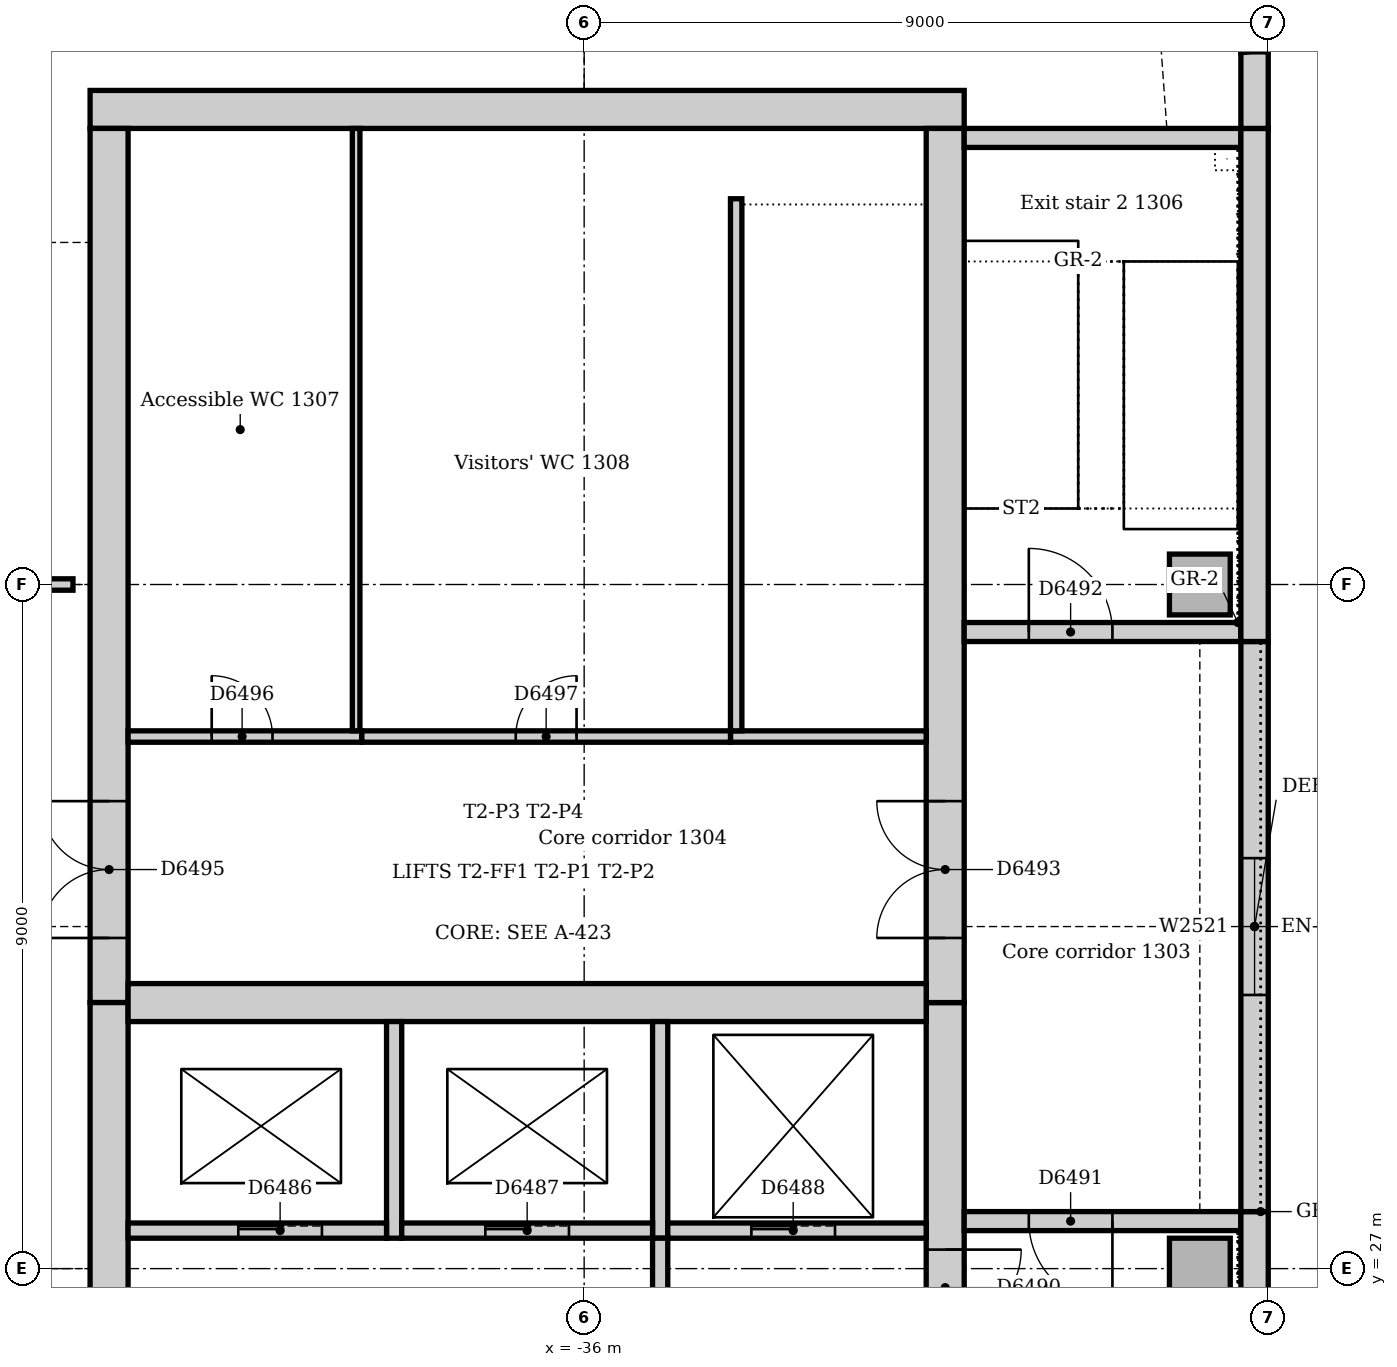
"""IFC4 building model, lengths in metres.
Left out: names, types, materials, properties, quantities, classifications, styles, units other than length and angle.
Written with IfcOpenShell. Run it as: python <this file> out.ifc"""

import sys

from ifc_helpers import new_model, si_unit, direction, frame, frame_2d, origin, origin_2d, place, context, subcontext, project, spatial, rectangle, extrude, element, fill, save


model = new_model("IFC4")
c1 = context("Model", 3, precision=1e-05, world=origin(), true_north=direction((0.0, 1.0)))
c2 = subcontext(c1, "Body", "Model", "MODEL_VIEW")
j1 = project(units=[si_unit("LENGTHUNIT", "METRE"), si_unit("PLANEANGLEUNIT", "RADIAN")], contexts=[c1])
p1 = place(None, origin())
s1 = spatial("IfcSite", under=j1, at=p1, CompositionType="ELEMENT")
p2 = place(p1, origin())
s2 = spatial("IfcBuilding", under=s1, at=p2, CompositionType="ELEMENT")
p3 = place(p2, frame((0.0, 0.0, 59.0)))
s3 = spatial("IfcBuildingStorey", under=s2, at=p3, CompositionType="ELEMENT", Elevation=59.0)
p4 = place(p3, frame((-31.0, 42.25, 0.0), z_axis=(0.0, 0.0, 1.0), x_axis=(-1.0, 0.0, 0.0)))
e1 = element("IfcWall", 1, at=p4, inside=s3, PredefinedType="SOLIDWALL", context=c2, shape_type="SweptSolid", body=[
    extrude(rectangle(XDim=11.5, YDim=0.5, at=frame_2d((5.75, 0.0))), origin(), (0.0, 0.0, 1.0), 4.0),
])
p5 = place(p3, frame((-31.25, 21.0, 0.0), z_axis=(0.0, 0.0, 1.0), x_axis=(0.0, 1.0, 0.0)))
e2 = element("IfcWall", 2, at=p5, inside=s3, PredefinedType="SOLIDWALL", context=c2, shape_type="SweptSolid", body=[
    extrude(rectangle(XDim=9.5, YDim=0.5, at=frame_2d((4.75, 0.0))), origin(), (0.0, 0.0, 1.0), 4.0),
])
p6 = place(p5, frame((5.25, 0.0, 0.0)))
e3 = element("IfcOpeningElement", 3, at=p6, cuts=e2, PredefinedType="OPENING", context=c2, shape_type="SweptSolid", body=[
    extrude(rectangle(XDim=1.0, YDim=2.1, at=frame_2d((0.5, 1.05))), frame((0.0, 0.26, 0.0), z_axis=(0.0, -1.0, 0.0), x_axis=(1.0, 0.0, 0.0)), (0.0, 0.0, 1.0), 0.52),
])
p7 = place(p3, frame((-31.25, 30.5, 0.0), z_axis=(0.0, 0.0, 1.0), x_axis=(0.0, 1.0, 0.0)))
e4 = element("IfcWall", 4, at=p7, inside=s3, PredefinedType="SOLIDWALL", context=c2, shape_type="SweptSolid", body=[
    extrude(rectangle(XDim=11.5, YDim=0.5, at=frame_2d((5.75, 0.0))), origin(), (0.0, 0.0, 1.0), 4.0),
])
p8 = place(p7, frame((0.85, 0.0, 0.0)))
e5 = element("IfcOpeningElement", 5, at=p8, cuts=e4, PredefinedType="OPENING", context=c2, shape_type="SweptSolid", body=[
    extrude(rectangle(XDim=1.8, YDim=2.1, at=frame_2d((0.9, 1.05))), frame((0.0, 0.26, 0.0), z_axis=(0.0, -1.0, 0.0), x_axis=(1.0, 0.0, 0.0)), (0.0, 0.0, 1.0), 0.52),
])
p9 = place(p3, frame((-42.25, 42.0, 0.0), z_axis=(0.0, 0.0, 1.0), x_axis=(0.0, -1.0, 0.0)))
e6 = element("IfcWall", 6, at=p9, inside=s3, PredefinedType="SOLIDWALL", context=c2, shape_type="SweptSolid", body=[
    extrude(rectangle(XDim=11.5, YDim=0.5, at=frame_2d((5.75, 0.0))), origin(), (0.0, 0.0, 1.0), 4.0),
])
p10 = place(p9, frame((8.85, 0.0, 0.0)))
e7 = element("IfcOpeningElement", 7, at=p10, cuts=e6, PredefinedType="OPENING", context=c2, shape_type="SweptSolid", body=[
    extrude(rectangle(XDim=1.8, YDim=2.1, at=frame_2d((0.9, 1.05))), frame((0.0, 0.26, 0.0), z_axis=(0.0, -1.0, 0.0), x_axis=(1.0, 0.0, 0.0)), (0.0, 0.0, 1.0), 0.52),
])
p11 = place(p3, frame((-42.25, 30.5, 0.0), z_axis=(0.0, 0.0, 1.0), x_axis=(0.0, -1.0, 0.0)))
e8 = element("IfcWall", 8, at=p11, inside=s3, PredefinedType="SOLIDWALL", context=c2, shape_type="SweptSolid", body=[
    extrude(rectangle(XDim=9.5, YDim=0.5, at=frame_2d((4.75, 0.0))), origin(), (0.0, 0.0, 1.0), 4.0),
])
p12 = place(p11, frame((3.85, 0.0, 0.0)))
e9 = element("IfcOpeningElement", 9, at=p12, cuts=e8, PredefinedType="OPENING", context=c2, shape_type="SweptSolid", body=[
    extrude(rectangle(XDim=1.8, YDim=2.1, at=frame_2d((0.9, 1.05))), frame((0.0, 0.26, 0.0), z_axis=(0.0, -1.0, 0.0), x_axis=(1.0, 0.0, 0.0)), (0.0, 0.0, 1.0), 0.52),
])
p13 = place(p3, frame((-42.0, 30.5, 0.0), z_axis=(0.0, 0.0, 1.0), x_axis=(1.0, 0.0, 0.0)))
e10 = element("IfcWall", 10, at=p13, inside=s3, PredefinedType="SOLIDWALL", context=c2, shape_type="SweptSolid", body=[
    extrude(rectangle(XDim=10.5, YDim=0.5, at=frame_2d((5.25, 0.0))), origin(), (0.0, 0.0, 1.0), 4.0),
])
p14 = place(p3, frame((-27.36, 27.625, 0.0), z_axis=(0.0, 0.0, 1.0), x_axis=(-1.0, 0.0, 0.0)))
e11 = element("IfcWall", 11, at=p14, inside=s3, PredefinedType="SOLIDWALL", context=c2, shape_type="SweptSolid", body=[
    extrude(rectangle(XDim=3.64, YDim=0.25, at=frame_2d((1.82, 0.0))), origin(), (0.0, 0.0, 1.0), 4.0),
])
p15 = place(p14, frame((1.69, 0.0, 0.0)))
e12 = element("IfcOpeningElement", 12, at=p15, cuts=e11, PredefinedType="OPENING", context=c2, shape_type="SweptSolid", body=[
    extrude(rectangle(XDim=1.1, YDim=2.1, at=frame_2d((0.55, 1.05))), frame((0.0, 0.135, 0.0), z_axis=(0.0, -1.0, 0.0), x_axis=(1.0, 0.0, 0.0)), (0.0, 0.0, 1.0), 0.27),
])
p16 = place(p3, frame((-31.0, 35.375, 0.0), z_axis=(0.0, 0.0, 1.0), x_axis=(1.0, 0.0, 0.0)))
e13 = element("IfcWall", 13, at=p16, inside=s3, PredefinedType="SOLIDWALL", context=c2, shape_type="SweptSolid", body=[
    extrude(rectangle(XDim=3.64, YDim=0.25, at=frame_2d((1.82, 0.0))), origin(), (0.0, 0.0, 1.0), 4.0),
])
p17 = place(p16, frame((0.85, 0.0, 0.0)))
e14 = element("IfcOpeningElement", 14, at=p17, cuts=e13, PredefinedType="OPENING", context=c2, shape_type="SweptSolid", body=[
    extrude(rectangle(XDim=1.1, YDim=2.1, at=frame_2d((0.55, 1.05))), frame((0.0, 0.135, 0.0), z_axis=(0.0, -1.0, 0.0), x_axis=(1.0, 0.0, 0.0)), (0.0, 0.0, 1.0), 0.27),
])
p18 = place(p3, frame((-27.36, 41.875, 0.0), z_axis=(0.0, 0.0, 1.0), x_axis=(-1.0, 0.0, 0.0)))
e15 = element("IfcWall", 15, at=p18, inside=s3, PredefinedType="SOLIDWALL", context=c2, shape_type="SweptSolid", body=[
    extrude(rectangle(XDim=3.64, YDim=0.25, at=frame_2d((1.82, 0.0))), origin(), (0.0, 0.0, 1.0), 4.0),
])
for number, where, z_axis, x_axis in (
    (16, (-27.9, 27.0, 0.0), (0.0, 0.0, 1.0), (1.0, 0.0, 0.0)),
    (17, (-27.9, 36.0, 0.0), (0.0, 0.0, 1.0), (1.0, 0.0, 0.0)),
):
    element("IfcColumn", number, at=place(p3, frame(where, z_axis=z_axis, x_axis=x_axis)), inside=s3, PredefinedType="COLUMN", context=c2, shape_type="SweptSolid", body=[
        extrude(rectangle(XDim=0.8, YDim=0.8, at=origin_2d()), origin(), (0.0, 0.0, 1.0), 4.0),
    ])
p19 = place(p3, frame((-27.18, 21.0, 0.0), z_axis=(0.0, 0.0, 1.0), x_axis=(0.0, 1.0, 0.0)))
e18 = element("IfcWall", 18, at=p19, inside=s3, PredefinedType="STANDARD", context=c2, shape_type="SweptSolid", body=[
    extrude(rectangle(XDim=6.75, YDim=0.36, at=frame_2d((3.375, 0.0))), origin(), (0.0, 0.0, 1.0), 3.85),
])
p20 = place(p3, frame((-27.18, 27.75, 0.0), z_axis=(0.0, 0.0, 1.0), x_axis=(0.0, 1.0, 0.0)))
e19 = element("IfcWall", 19, at=p20, inside=s3, PredefinedType="STANDARD", context=c2, shape_type="SweptSolid", body=[
    extrude(rectangle(XDim=7.5, YDim=0.36, at=frame_2d((3.75, 0.0))), origin(), (0.0, 0.0, 1.0), 3.85),
])
p21 = place(p20, frame((2.85, 0.0, 1.2)))
e20 = element("IfcOpeningElement", 20, at=p21, cuts=e19, PredefinedType="OPENING", context=c2, shape_type="SweptSolid", body=[
    extrude(rectangle(XDim=1.8, YDim=1.2, at=frame_2d((0.9, 0.6))), frame((0.0, 0.19, 0.0), z_axis=(0.0, -1.0, 0.0), x_axis=(1.0, 0.0, 0.0)), (0.0, 0.0, 1.0), 0.38),
])
p22 = place(p3, frame((-27.18, 35.25, 0.0), z_axis=(0.0, 0.0, 1.0), x_axis=(0.0, 1.0, 0.0)))
e21 = element("IfcWall", 21, at=p22, inside=s3, PredefinedType="STANDARD", context=c2, shape_type="SweptSolid", body=[
    extrude(rectangle(XDim=6.75, YDim=0.36, at=frame_2d((3.375, 0.0))), origin(), (0.0, 0.0, 1.0), 3.85),
])
p23 = place(p3, frame((-27.18, 42.0, 0.0), z_axis=(0.0, 0.0, 1.0), x_axis=(0.0, 1.0, 0.0)))
e22 = element("IfcWall", 22, at=p23, inside=s3, PredefinedType="STANDARD", context=c2, shape_type="SweptSolid", body=[
    extrude(rectangle(XDim=1.007, YDim=0.36, at=frame_2d((0.504, 0.0))), origin(), (0.0, 0.0, 1.0), 3.85),
])
p24 = place(p3, frame((-27.183, 43.019, 0.0), z_axis=(0.0, 0.0, 1.0), x_axis=(-0.13055608231, 0.99144092581, 0.0)))
e23 = element("IfcWall", 23, at=p24, inside=s3, PredefinedType="STANDARD", context=c2, shape_type="SweptSolid", body=[
    extrude(rectangle(XDim=0.713, YDim=0.36, at=frame_2d((0.356, 0.0))), origin(), (0.0, 0.0, 1.0), 3.85),
])
p25 = place(p3, frame((-38.5, 27.4, 0.0), z_axis=(0.0, 0.0, 1.0), x_axis=(0.0, 1.0, 0.0)))
e24 = element("IfcWall", 24, at=p25, inside=s3, PredefinedType="SOLIDWALL", context=c2, shape_type="SweptSolid", body=[
    extrude(rectangle(XDim=2.85, YDim=0.2, at=frame_2d((1.425, 0.0))), origin(), (0.0, 0.0, 1.0), 4.0),
])
p26 = place(p3, frame((-42.0, 27.5, 0.0), z_axis=(0.0, 0.0, 1.0), x_axis=(1.0, 0.0, 0.0)))
e25 = element("IfcWall", 25, at=p26, inside=s3, PredefinedType="SOLIDWALL", context=c2, shape_type="SweptSolid", body=[
    extrude(rectangle(XDim=3.4, YDim=0.2, at=frame_2d((1.7, 0.0))), origin(), (0.0, 0.0, 1.0), 4.0),
])
p27 = place(p26, frame((1.45, 0.0, 0.0)))
e26 = element("IfcOpeningElement", 26, at=p27, cuts=e25, PredefinedType="OPENING", context=c2, shape_type="SweptSolid", body=[
    extrude(rectangle(XDim=1.1, YDim=2.1, at=frame_2d((0.55, 1.05))), frame((0.0, 0.11, 0.0), z_axis=(0.0, -1.0, 0.0), x_axis=(1.0, 0.0, 0.0)), (0.0, 0.0, 1.0), 0.22),
])
p28 = place(p3, frame((-35.0, 27.4, 0.0), z_axis=(0.0, 0.0, 1.0), x_axis=(0.0, 1.0, 0.0)))
e27 = element("IfcWall", 27, at=p28, inside=s3, PredefinedType="SOLIDWALL", context=c2, shape_type="SweptSolid", body=[
    extrude(rectangle(XDim=2.85, YDim=0.2, at=frame_2d((1.425, 0.0))), origin(), (0.0, 0.0, 1.0), 4.0),
])
p29 = place(p3, frame((-38.4, 27.5, 0.0), z_axis=(0.0, 0.0, 1.0), x_axis=(1.0, 0.0, 0.0)))
e28 = element("IfcWall", 28, at=p29, inside=s3, PredefinedType="SOLIDWALL", context=c2, shape_type="SweptSolid", body=[
    extrude(rectangle(XDim=3.3, YDim=0.2, at=frame_2d((1.65, 0.0))), origin(), (0.0, 0.0, 1.0), 4.0),
])
p30 = place(p29, frame((1.1, 0.0, 0.0)))
e29 = element("IfcOpeningElement", 29, at=p30, cuts=e28, PredefinedType="OPENING", context=c2, shape_type="SweptSolid", body=[
    extrude(rectangle(XDim=1.1, YDim=2.1, at=frame_2d((0.55, 1.05))), frame((0.0, 0.11, 0.0), z_axis=(0.0, -1.0, 0.0), x_axis=(1.0, 0.0, 0.0)), (0.0, 0.0, 1.0), 0.22),
])
p31 = place(p3, frame((-34.9, 27.5, 0.0), z_axis=(0.0, 0.0, 1.0), x_axis=(1.0, 0.0, 0.0)))
e30 = element("IfcWall", 30, at=p31, inside=s3, PredefinedType="SOLIDWALL", context=c2, shape_type="SweptSolid", body=[
    extrude(rectangle(XDim=3.4, YDim=0.2, at=frame_2d((1.7, 0.0))), origin(), (0.0, 0.0, 1.0), 4.0),
])
p32 = place(p31, frame((1.1, 0.0, 0.0)))
e31 = element("IfcOpeningElement", 31, at=p32, cuts=e30, PredefinedType="OPENING", context=c2, shape_type="SweptSolid", body=[
    extrude(rectangle(XDim=1.1, YDim=2.1, at=frame_2d((0.55, 1.05))), frame((0.0, 0.11, 0.0), z_axis=(0.0, -1.0, 0.0), x_axis=(1.0, 0.0, 0.0)), (0.0, 0.0, 1.0), 0.22),
])
p33 = place(p3, frame((-35.0, 24.1, 0.0), z_axis=(0.0, 0.0, 1.0), x_axis=(0.0, 1.0, 0.0)))
e32 = element("IfcWall", 32, at=p33, inside=s3, PredefinedType="SOLIDWALL", context=c2, shape_type="SweptSolid", body=[
    extrude(rectangle(XDim=3.3, YDim=0.2, at=frame_2d((1.65, 0.0))), origin(), (0.0, 0.0, 1.0), 4.0),
])
p34 = place(p33, frame((1.15, 0.0, 0.0)))
e33 = element("IfcOpeningElement", 33, at=p34, cuts=e32, PredefinedType="OPENING", context=c2, shape_type="SweptSolid", body=[
    extrude(rectangle(XDim=1.0, YDim=2.1, at=frame_2d((0.5, 1.05))), frame((0.0, 0.11, 0.0), z_axis=(0.0, -1.0, 0.0), x_axis=(1.0, 0.0, 0.0)), (0.0, 0.0, 1.0), 0.22),
])
p35 = place(p3, frame((-34.075, 34.0, 0.0), z_axis=(0.0, 0.0, 1.0), x_axis=(1.0, 0.0, 0.0)))
e34 = element("IfcWall", 34, at=p35, inside=s3, PredefinedType="SOLIDWALL", context=c2, shape_type="SweptSolid", body=[
    extrude(rectangle(XDim=2.575, YDim=0.15, at=frame_2d((1.288, 0.0))), origin(), (0.0, 0.0, 1.0), 4.0),
])
p36 = place(p3, frame((-34.0, 41.075, 0.0), z_axis=(0.0, 0.0, 1.0), x_axis=(0.0, -1.0, 0.0)))
e35 = element("IfcWall", 35, at=p36, inside=s3, PredefinedType="SOLIDWALL", context=c2, shape_type="SweptSolid", body=[
    extrude(rectangle(XDim=7.0, YDim=0.15, at=frame_2d((3.5, 0.0))), origin(), (0.0, 0.0, 1.0), 4.0),
])
p37 = place(p3, frame((-38.925, 34.0, 0.0), z_axis=(0.0, 0.0, 1.0), x_axis=(-1.0, 0.0, 0.0)))
e36 = element("IfcWall", 36, at=p37, inside=s3, PredefinedType="PARTITIONING", context=c2, shape_type="SweptSolid", body=[
    extrude(rectangle(XDim=3.075, YDim=0.15, at=frame_2d((1.538, 0.0))), origin(), (0.0, 0.0, 1.0), 3.85),
])
p38 = place(p37, frame((1.175, 0.0, 0.0)))
e37 = element("IfcOpeningElement", 37, at=p38, cuts=e36, PredefinedType="OPENING", context=c2, shape_type="SweptSolid", body=[
    extrude(rectangle(XDim=0.8, YDim=2.1, at=frame_2d((0.4, 1.05))), frame((0.0, 0.085, 0.0), z_axis=(0.0, -1.0, 0.0), x_axis=(1.0, 0.0, 0.0)), (0.0, 0.0, 1.0), 0.17),
])
p39 = place(p3, frame((-34.075, 34.0, 0.0), z_axis=(0.0, 0.0, 1.0), x_axis=(-1.0, 0.0, 0.0)))
e38 = element("IfcWall", 38, at=p39, inside=s3, PredefinedType="PARTITIONING", context=c2, shape_type="SweptSolid", body=[
    extrude(rectangle(XDim=4.85, YDim=0.15, at=frame_2d((2.425, 0.0))), origin(), (0.0, 0.0, 1.0), 3.85),
])
p40 = place(p39, frame((2.025, 0.0, 0.0)))
e39 = element("IfcOpeningElement", 39, at=p40, cuts=e38, PredefinedType="OPENING", context=c2, shape_type="SweptSolid", body=[
    extrude(rectangle(XDim=0.8, YDim=2.1, at=frame_2d((0.4, 1.05))), frame((0.0, 0.085, 0.0), z_axis=(0.0, -1.0, 0.0), x_axis=(1.0, 0.0, 0.0)), (0.0, 0.0, 1.0), 0.17),
])
p41 = place(p3, frame((-39.0, 34.075, 0.0), z_axis=(0.0, 0.0, 1.0), x_axis=(0.0, 1.0, 0.0)))
e40 = element("IfcWall", 40, at=p41, inside=s3, PredefinedType="PARTITIONING", context=c2, shape_type="SweptSolid", body=[
    extrude(rectangle(XDim=7.925, YDim=0.1, at=frame_2d((3.962, 0.0))), origin(), (0.0, 0.0, 1.0), 3.85),
])
p42 = place(p3, frame((-44.65, 36.0, 0.0), z_axis=(0.0, 0.0, 1.0), x_axis=(1.0, 0.0, 0.0)))
e41 = element("IfcWall", 41, at=p42, inside=s3, PredefinedType="PARTITIONING", context=c2, shape_type="SweptSolid", body=[
    extrude(rectangle(XDim=1.925, YDim=0.15, at=frame_2d((0.963, 0.0))), origin(), (0.0, 0.0, 1.0), 3.602),
])
p43 = place(p42, frame((0.5, 0.0, 0.0)))
e42 = element("IfcOpeningElement", 42, at=p43, cuts=e41, PredefinedType="OPENING", context=c2, shape_type="SweptSolid", body=[
    extrude(rectangle(XDim=0.9, YDim=2.1, at=frame_2d((0.45, 1.05))), frame((0.0, 0.085, 0.0), z_axis=(0.0, -1.0, 0.0), x_axis=(1.0, 0.0, 0.0)), (0.0, 0.0, 1.0), 0.17),
])
p44 = place(p21, origin())
e43 = element("IfcWindow", 43, at=p44, inside=s3, PartitioningType="SINGLE_PANEL", PredefinedType="WINDOW", context=c2, shape_type="SweptSolid", body=[
    extrude(rectangle(XDim=1.8, YDim=1.2, at=frame_2d((0.9, 0.6))), frame((0.0, 0.13, 0.0), z_axis=(0.0, -1.0, 0.0), x_axis=(1.0, 0.0, 0.0)), (0.0, 0.0, 1.0), 0.06),
])
fill(e20, e43)
p45 = place(p27, origin())
e44 = element("IfcDoor", 44, at=p45, inside=s3, OperationType="SLIDING_TO_LEFT", PredefinedType="DOOR", context=c2, shape_type="SweptSolid", body=[
    extrude(rectangle(XDim=1.1, YDim=2.1, at=frame_2d((0.55, 1.05))), frame((0.0, 0.025, 0.0), z_axis=(0.0, -1.0, 0.0), x_axis=(1.0, 0.0, 0.0)), (0.0, 0.0, 1.0), 0.05),
])
fill(e26, e44)
p46 = place(p30, origin())
e45 = element("IfcDoor", 45, at=p46, inside=s3, OperationType="SLIDING_TO_LEFT", PredefinedType="DOOR", context=c2, shape_type="SweptSolid", body=[
    extrude(rectangle(XDim=1.1, YDim=2.1, at=frame_2d((0.55, 1.05))), frame((0.0, 0.025, 0.0), z_axis=(0.0, -1.0, 0.0), x_axis=(1.0, 0.0, 0.0)), (0.0, 0.0, 1.0), 0.05),
])
fill(e29, e45)
p47 = place(p32, origin())
e46 = element("IfcDoor", 46, at=p47, inside=s3, OperationType="SLIDING_TO_LEFT", PredefinedType="DOOR", context=c2, shape_type="SweptSolid", body=[
    extrude(rectangle(XDim=1.1, YDim=2.1, at=frame_2d((0.55, 1.05))), frame((0.0, 0.025, 0.0), z_axis=(0.0, -1.0, 0.0), x_axis=(1.0, 0.0, 0.0)), (0.0, 0.0, 1.0), 0.05),
])
fill(e31, e46)
p48 = place(p6, frame((1.0, 0.0, 0.0), z_axis=(0.0, 0.0, 1.0), x_axis=(-1.0, 0.0, 0.0)))
e47 = element("IfcDoor", 47, at=p48, inside=s3, OperationType="SINGLE_SWING_LEFT", PredefinedType="DOOR", context=c2, shape_type="SweptSolid", body=[
    extrude(rectangle(XDim=1.0, YDim=2.1, at=frame_2d((0.5, 1.05))), frame((0.0, 0.025, 0.0), z_axis=(0.0, -1.0, 0.0), x_axis=(1.0, 0.0, 0.0)), (0.0, 0.0, 1.0), 0.05),
])
fill(e3, e47)
p49 = place(p15, origin())
e48 = element("IfcDoor", 48, at=p49, inside=s3, OperationType="SINGLE_SWING_LEFT", PredefinedType="DOOR", context=c2, shape_type="SweptSolid", body=[
    extrude(rectangle(XDim=1.1, YDim=2.1, at=frame_2d((0.55, 1.05))), frame((0.0, 0.025, 0.0), z_axis=(0.0, -1.0, 0.0), x_axis=(1.0, 0.0, 0.0)), (0.0, 0.0, 1.0), 0.05),
])
fill(e12, e48)
p50 = place(p17, origin())
e49 = element("IfcDoor", 49, at=p50, inside=s3, OperationType="SINGLE_SWING_LEFT", PredefinedType="DOOR", context=c2, shape_type="SweptSolid", body=[
    extrude(rectangle(XDim=1.1, YDim=2.1, at=frame_2d((0.55, 1.05))), frame((0.0, 0.025, 0.0), z_axis=(0.0, -1.0, 0.0), x_axis=(1.0, 0.0, 0.0)), (0.0, 0.0, 1.0), 0.05),
])
fill(e14, e49)
p51 = place(p8, origin())
e50 = element("IfcDoor", 50, at=p51, inside=s3, OperationType="DOUBLE_DOOR_SINGLE_SWING", PredefinedType="DOOR", context=c2, shape_type="SweptSolid", body=[
    extrude(rectangle(XDim=1.8, YDim=2.1, at=frame_2d((0.9, 1.05))), frame((0.0, 0.025, 0.0), z_axis=(0.0, -1.0, 0.0), x_axis=(1.0, 0.0, 0.0)), (0.0, 0.0, 1.0), 0.05),
])
fill(e5, e50)
p52 = place(p10, frame((1.8, 0.0, 0.0), z_axis=(0.0, 0.0, 1.0), x_axis=(-1.0, 0.0, 0.0)))
e51 = element("IfcDoor", 51, at=p52, inside=s3, OperationType="DOUBLE_DOOR_SINGLE_SWING", PredefinedType="DOOR", context=c2, shape_type="SweptSolid", body=[
    extrude(rectangle(XDim=1.8, YDim=2.1, at=frame_2d((0.9, 1.05))), frame((0.0, 0.025, 0.0), z_axis=(0.0, -1.0, 0.0), x_axis=(1.0, 0.0, 0.0)), (0.0, 0.0, 1.0), 0.05),
])
fill(e7, e51)
p53 = place(p38, frame((0.8, 0.0, 0.0), z_axis=(0.0, 0.0, 1.0), x_axis=(-1.0, 0.0, 0.0)))
e52 = element("IfcDoor", 52, at=p53, inside=s3, OperationType="SINGLE_SWING_LEFT", PredefinedType="DOOR", context=c2, shape_type="SweptSolid", body=[
    extrude(rectangle(XDim=0.8, YDim=2.1, at=frame_2d((0.4, 1.05))), frame((0.0, 0.025, 0.0), z_axis=(0.0, -1.0, 0.0), x_axis=(1.0, 0.0, 0.0)), (0.0, 0.0, 1.0), 0.05),
])
fill(e37, e52)
p54 = place(p40, frame((0.8, 0.0, 0.0), z_axis=(0.0, 0.0, 1.0), x_axis=(-1.0, 0.0, 0.0)))
e53 = element("IfcDoor", 53, at=p54, inside=s3, OperationType="SINGLE_SWING_RIGHT", PredefinedType="DOOR", context=c2, shape_type="SweptSolid", body=[
    extrude(rectangle(XDim=0.8, YDim=2.1, at=frame_2d((0.4, 1.05))), frame((0.0, 0.025, 0.0), z_axis=(0.0, -1.0, 0.0), x_axis=(1.0, 0.0, 0.0)), (0.0, 0.0, 1.0), 0.05),
])
fill(e39, e53)
save(model, sys.argv[1])
